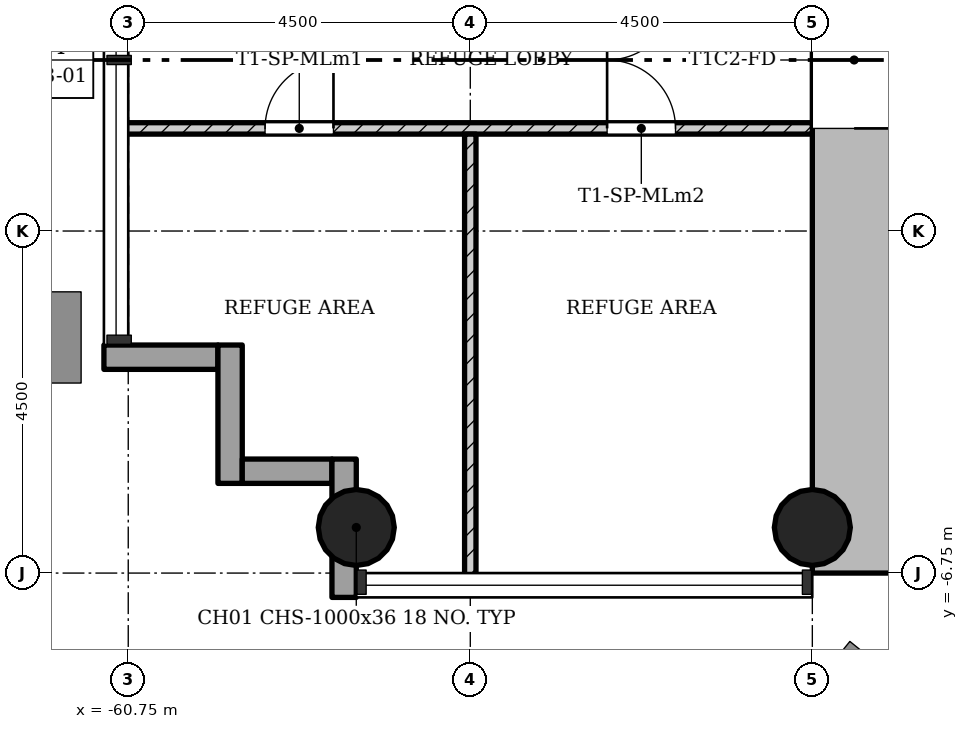
"""IFC4 building model, lengths in metres.
Left out: names, types, materials, properties, quantities, classifications, styles, units other than length and angle.
Written with IfcOpenShell. Run it as: python <this file> out.ifc"""

import sys

from ifc_helpers import new_model, si_unit, direction, frame, frame_2d, origin, origin_2d, place, context, subcontext, project, spatial, rectangle, hollow_circle, extrude, element, fill, save


model = new_model("IFC4")
c1 = context("Model", 3, precision=1e-05, world=origin(), true_north=direction((0.0, 1.0)))
c2 = subcontext(c1, "Body", "Model", "MODEL_VIEW")
j1 = project(units=[si_unit("LENGTHUNIT", "METRE"), si_unit("PLANEANGLEUNIT", "RADIAN")], contexts=[c1])
p1 = place(None, origin())
s1 = spatial("IfcSite", under=j1, at=p1, CompositionType="ELEMENT")
p2 = place(p1, origin())
s2 = spatial("IfcBuilding", under=s1, at=p2, CompositionType="ELEMENT")
p3 = place(p2, frame((0.0, 0.0, 72.1)))
s3 = spatial("IfcBuildingStorey", under=s2, at=p3, CompositionType="ELEMENT", Elevation=72.1)
p4 = place(p3, frame((-51.2, 5.65, 0.0), z_axis=(0.0, 0.0, 1.0), x_axis=(0.0, -1.0, 0.0)))
e1 = element("IfcWall", 1, at=p4, inside=s3, PredefinedType="SHEAR", context=c2, shape_type="SweptSolid", body=[
    extrude(rectangle(XDim=12.4, YDim=1.1, at=frame_2d((6.2, 0.0))), origin(), (0.0, 0.0, 1.0), 4.5),
])
p5 = place(p4, frame((4.75, 0.0, 0.0)))
e2 = element("IfcOpeningElement", 2, at=p5, cuts=e1, PredefinedType="OPENING", context=c2, shape_type="SweptSolid", body=[
    extrude(rectangle(XDim=1.8, YDim=2.1, at=frame_2d((0.9, 1.05))), frame((0.0, 0.56, 0.0), z_axis=(0.0, -1.0, 0.0), x_axis=(1.0, 0.0, 0.0)), (0.0, 0.0, 1.0), 1.12),
])
for number, where, z_axis, x_axis in (
    (3, (-51.75, -6.15, 0.0), (0.0, 0.0, 1.0), (1.0, 0.0, 0.0)),
    (4, (-57.75, -6.15, 0.0), (0.0, 0.0, 1.0), (1.0, 0.0, 0.0)),
):
    element("IfcColumn", number, at=place(p3, frame(where, z_axis=z_axis, x_axis=x_axis)), inside=s3, PredefinedType="COLUMN", context=c2, shape_type="SweptSolid", body=[
        extrude(hollow_circle(Radius=0.5, WallThickness=0.036, at=origin_2d()), origin(), (0.0, 0.0, 1.0), 4.5),
    ])
p6 = place(p3, frame((-61.07, -3.91, -0.3), z_axis=(0.0, 0.0, 1.0), x_axis=(1.0, 0.0, 0.0)))
e5 = element("IfcWall", 5, at=p6, inside=s3, PredefinedType="STANDARD", context=c2, shape_type="SweptSolid", body=[
    extrude(rectangle(XDim=1.5, YDim=0.32, at=frame_2d((0.75, 0.0))), origin(), (0.0, 0.0, 1.0), 4.5),
])
p7 = place(p3, frame((-59.41, -3.75, -0.3), z_axis=(0.0, 0.0, 1.0), x_axis=(0.0, -1.0, 0.0)))
e6 = element("IfcWall", 6, at=p7, inside=s3, PredefinedType="STANDARD", context=c2, shape_type="SweptSolid", body=[
    extrude(rectangle(XDim=1.82, YDim=0.32, at=frame_2d((0.91, 0.0))), origin(), (0.0, 0.0, 1.0), 4.5),
])
p8 = place(p3, frame((-59.25, -5.41, -0.3), z_axis=(0.0, 0.0, 1.0), x_axis=(1.0, 0.0, 0.0)))
e7 = element("IfcWall", 7, at=p8, inside=s3, PredefinedType="STANDARD", context=c2, shape_type="SweptSolid", body=[
    extrude(rectangle(XDim=1.18, YDim=0.32, at=frame_2d((0.59, 0.0))), origin(), (0.0, 0.0, 1.0), 4.5),
])
p9 = place(p3, frame((-57.91, -5.25, -0.3), z_axis=(0.0, 0.0, 1.0), x_axis=(0.0, -1.0, 0.0)))
e8 = element("IfcWall", 8, at=p9, inside=s3, PredefinedType="STANDARD", context=c2, shape_type="SweptSolid", body=[
    extrude(rectangle(XDim=1.82, YDim=0.32, at=frame_2d((0.91, 0.0))), origin(), (0.0, 0.0, 1.0), 4.5),
])
p10 = place(p3, frame((-60.85, -0.9, 0.0), z_axis=(0.0, 0.0, 1.0), x_axis=(1.0, 0.0, 0.0)))
e9 = element("IfcWall", 9, at=p10, inside=s3, PredefinedType="PARTITIONING", context=c2, shape_type="SweptSolid", body=[
    extrude(rectangle(XDim=9.1, YDim=0.15, at=frame_2d((4.55, 0.0))), origin(), (0.0, 0.0, 1.0), 4.08),
])
p11 = place(p10, frame((1.9, 0.0, 0.0)))
e10 = element("IfcOpeningElement", 10, at=p11, cuts=e9, PredefinedType="OPENING", context=c2, shape_type="SweptSolid", body=[
    extrude(rectangle(XDim=0.9, YDim=2.1, at=frame_2d((0.45, 1.05))), frame((0.0, 0.085, 0.0), z_axis=(0.0, -1.0, 0.0), x_axis=(1.0, 0.0, 0.0)), (0.0, 0.0, 1.0), 0.17),
])
p12 = place(p10, frame((6.4, 0.0, 0.0)))
e11 = element("IfcOpeningElement", 11, at=p12, cuts=e9, PredefinedType="OPENING", context=c2, shape_type="SweptSolid", body=[
    extrude(rectangle(XDim=0.9, YDim=2.1, at=frame_2d((0.45, 1.05))), frame((0.0, 0.085, 0.0), z_axis=(0.0, -1.0, 0.0), x_axis=(1.0, 0.0, 0.0)), (0.0, 0.0, 1.0), 0.17),
])
p13 = place(p3, frame((-56.25, -0.975, 0.0), z_axis=(0.0, 0.0, 1.0), x_axis=(0.0, -1.0, 0.0)))
e12 = element("IfcWall", 12, at=p13, inside=s3, PredefinedType="PARTITIONING", context=c2, shape_type="SweptSolid", body=[
    extrude(rectangle(XDim=5.875, YDim=0.15, at=frame_2d((2.938, 0.0))), origin(), (0.0, 0.0, 1.0), 4.08),
])
p14 = place(p11, origin())
e13 = element("IfcDoor", 13, at=p14, inside=s3, OperationType="SINGLE_SWING_LEFT", PredefinedType="DOOR", context=c2, shape_type="SweptSolid", body=[
    extrude(rectangle(XDim=0.9, YDim=2.1, at=frame_2d((0.45, 1.05))), frame((0.0, 0.025, 0.0), z_axis=(0.0, -1.0, 0.0), x_axis=(1.0, 0.0, 0.0)), (0.0, 0.0, 1.0), 0.05),
])
fill(e10, e13)
p15 = place(p12, origin())
e14 = element("IfcDoor", 14, at=p15, inside=s3, OperationType="SINGLE_SWING_RIGHT", PredefinedType="DOOR", context=c2, shape_type="SweptSolid", body=[
    extrude(rectangle(XDim=0.9, YDim=2.1, at=frame_2d((0.45, 1.05))), frame((0.0, 0.025, 0.0), z_axis=(0.0, -1.0, 0.0), x_axis=(1.0, 0.0, 0.0)), (0.0, 0.0, 1.0), 0.05),
])
fill(e11, e14)
p16 = place(p5, origin())
e15 = element("IfcDoor", 15, at=p16, inside=s3, OperationType="SINGLE_SWING_LEFT", PredefinedType="DOOR", context=c2, shape_type="SweptSolid", body=[
    extrude(rectangle(XDim=1.8, YDim=2.1, at=frame_2d((0.9, 1.05))), frame((0.0, 0.025, 0.0), z_axis=(0.0, -1.0, 0.0), x_axis=(1.0, 0.0, 0.0)), (0.0, 0.0, 1.0), 0.05),
])
fill(e2, e15)
save(model, sys.argv[1])
